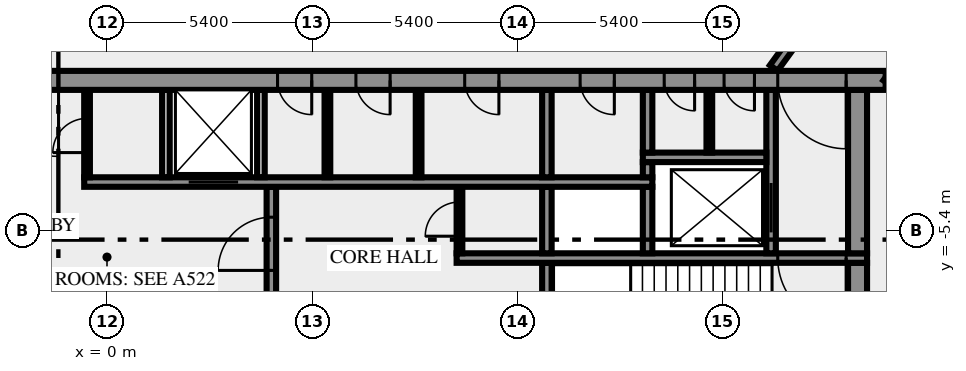
"""IFC4 building model, lengths in metres.
Left out: names, types, materials, properties, quantities, classifications, styles, units other than length and angle.
Written with IfcOpenShell. Run it as: python <this file> out.ifc"""

import sys

from ifc_helpers import new_model, si_unit, direction, frame, frame_2d, origin, place, context, subcontext, project, spatial, rectangle, extrude, element, fill, save


model = new_model("IFC4")
c1 = context("Model", 3, precision=1e-05, world=origin(), true_north=direction((0.0, 1.0)))
c2 = subcontext(c1, "Body", "Model", "MODEL_VIEW")
j1 = project(units=[si_unit("LENGTHUNIT", "METRE"), si_unit("PLANEANGLEUNIT", "RADIAN")], contexts=[c1])
p1 = place(None, origin())
s1 = spatial("IfcSite", under=j1, at=p1, CompositionType="ELEMENT")
p2 = place(p1, origin())
s2 = spatial("IfcBuilding", under=s1, at=p2, CompositionType="ELEMENT")
p3 = place(p2, frame((0.0, 0.0, 327.0)))
s3 = spatial("IfcBuildingStorey", under=s2, at=p3, CompositionType="ELEMENT", Elevation=327.0)
p4 = place(p3, frame((19.75, -10.5, 0.0), z_axis=(0.0, 0.0, 1.0), x_axis=(0.0, 1.0, 0.0)))
e1 = element("IfcWall", 1, at=p4, inside=s3, PredefinedType="SHEAR", context=c2, shape_type="SweptSolid", body=[
    extrude(rectangle(XDim=4.25, YDim=0.5, at=frame_2d((2.125, 0.0))), origin(), (0.0, 0.0, 1.0), 3.65),
])
p5 = place(p3, frame((4.325, -7.25, 0.0), z_axis=(0.0, 0.0, 1.0), x_axis=(0.0, 1.0, 0.0)))
e2 = element("IfcWall", 2, at=p5, inside=s3, PredefinedType="SHEAR", context=c2, shape_type="SweptSolid", body=[
    extrude(rectangle(XDim=3.0, YDim=0.25, at=frame_2d((1.5, 0.0))), origin(), (0.0, 0.0, 1.0), 3.65),
])
p6 = place(p5, frame((0.8, 0.0, 0.0)))
e3 = element("IfcOpeningElement", 3, at=p6, cuts=e2, PredefinedType="OPENING", context=c2, shape_type="SweptSolid", body=[
    extrude(rectangle(XDim=1.4, YDim=2.1, at=frame_2d((0.7, 1.05))), frame((0.0, 0.135, 0.0), z_axis=(0.0, -1.0, 0.0), x_axis=(1.0, 0.0, 0.0)), (0.0, 0.0, 1.0), 0.27),
])
p7 = place(p3, frame((11.575, -7.25, 0.0), z_axis=(0.0, 0.0, 1.0), x_axis=(0.0, 1.0, 0.0)))
e4 = element("IfcWall", 4, at=p7, inside=s3, PredefinedType="SHEAR", context=c2, shape_type="SweptSolid", body=[
    extrude(rectangle(XDim=1.0, YDim=0.25, at=frame_2d((0.5, 0.0))), origin(), (0.0, 0.0, 1.0), 3.65),
])
p8 = place(p3, frame((20.0, -6.125, 0.0), z_axis=(0.0, 0.0, 1.0), x_axis=(-1.0, 0.0, 0.0)))
e5 = element("IfcWall", 5, at=p8, inside=s3, PredefinedType="SHEAR", context=c2, shape_type="SweptSolid", body=[
    extrude(rectangle(XDim=10.8, YDim=0.25, at=frame_2d((5.4, 0.0))), origin(), (0.0, 0.0, 1.0), 3.65),
])
p9 = place(p8, frame((0.55, 0.0, 0.0)))
e6 = element("IfcOpeningElement", 6, at=p9, cuts=e5, PredefinedType="OPENING", context=c2, shape_type="SweptSolid", body=[
    extrude(rectangle(XDim=1.8, YDim=2.1, at=frame_2d((0.9, 1.05))), frame((0.0, 0.135, 0.0), z_axis=(0.0, -1.0, 0.0), x_axis=(1.0, 0.0, 0.0)), (0.0, 0.0, 1.0), 0.27),
])
p10 = place(p3, frame((9.275, -6.0, 0.0), z_axis=(0.0, 0.0, 1.0), x_axis=(0.0, 1.0, 0.0)))
e7 = element("IfcWall", 7, at=p10, inside=s3, PredefinedType="PARTITIONING", context=c2, shape_type="SweptSolid", body=[
    extrude(rectangle(XDim=1.75, YDim=0.15, at=frame_2d((0.875, 0.0))), origin(), (0.0, 0.0, 1.0), 3.65),
])
p11 = place(p10, frame((0.45, 0.0, 0.0)))
e8 = element("IfcOpeningElement", 8, at=p11, cuts=e7, PredefinedType="OPENING", context=c2, shape_type="SweptSolid", body=[
    extrude(rectangle(XDim=0.9, YDim=2.1, at=frame_2d((0.45, 1.05))), frame((0.0, 0.085, 0.0), z_axis=(0.0, -1.0, 0.0), x_axis=(1.0, 0.0, 0.0)), (0.0, 0.0, 1.0), 0.17),
])
for number, where, z_axis, x_axis in (
    (9, (11.575, -6.0, 0.0), (0.0, 0.0, 1.0), (0.0, 1.0, 0.0)),
    (10, (14.225, -6.0, 0.0), (0.0, 0.0, 1.0), (0.0, 1.0, 0.0)),
):
    element("IfcWall", number, at=place(p3, frame(where, z_axis=z_axis, x_axis=x_axis)), inside=s3, PredefinedType="SHEAR", context=c2, shape_type="SweptSolid", body=[
        extrude(rectangle(XDim=1.75, YDim=0.25, at=frame_2d((0.875, 0.0))), origin(), (0.0, 0.0, 1.0), 3.65),
    ])
p12 = place(p3, frame((17.475, -6.0, 0.0), z_axis=(0.0, 0.0, 1.0), x_axis=(0.0, 1.0, 0.0)))
e11 = element("IfcWall", 11, at=p12, inside=s3, PredefinedType="SHEAR", context=c2, shape_type="SweptSolid", body=[
    extrude(rectangle(XDim=4.3, YDim=0.25, at=frame_2d((2.15, 0.0))), origin(), (0.0, 0.0, 1.0), 3.65),
])
p13 = place(p12, frame((0.55, 0.0, 0.0)))
e12 = element("IfcOpeningElement", 12, at=p13, cuts=e11, PredefinedType="OPENING", context=c2, shape_type="SweptSolid", body=[
    extrude(rectangle(XDim=1.3, YDim=2.1, at=frame_2d((0.65, 1.05))), frame((0.0, 0.135, 0.0), z_axis=(0.0, -1.0, 0.0), x_axis=(1.0, 0.0, 0.0)), (0.0, 0.0, 1.0), 0.27),
])
p14 = place(p3, frame((19.75, -6.0, 0.0), z_axis=(0.0, 0.0, 1.0), x_axis=(0.0, 1.0, 0.0)))
e13 = element("IfcWall", 13, at=p14, inside=s3, PredefinedType="SHEAR", context=c2, shape_type="SweptSolid", body=[
    extrude(rectangle(XDim=4.3, YDim=0.5, at=frame_2d((2.15, 0.0))), origin(), (0.0, 0.0, 1.0), 3.65),
])
p15 = place(p3, frame((-0.6, -4.125, 0.0), z_axis=(0.0, 0.0, 1.0), x_axis=(1.0, 0.0, 0.0)))
e14 = element("IfcWall", 14, at=p15, inside=s3, PredefinedType="SHEAR", context=c2, shape_type="SweptSolid", body=[
    extrude(rectangle(XDim=14.95, YDim=0.25, at=frame_2d((7.475, 0.0))), origin(), (0.0, 0.0, 1.0), 3.65),
])
p16 = place(p15, frame((2.75, 0.0, 0.0)))
e15 = element("IfcOpeningElement", 15, at=p16, cuts=e14, PredefinedType="OPENING", context=c2, shape_type="SweptSolid", body=[
    extrude(rectangle(XDim=1.3, YDim=2.1, at=frame_2d((0.65, 1.05))), frame((0.0, 0.135, 0.0), z_axis=(0.0, -1.0, 0.0), x_axis=(1.0, 0.0, 0.0)), (0.0, 0.0, 1.0), 0.27),
])
p17 = place(p3, frame((-0.525, -4.0, 0.0), z_axis=(0.0, 0.0, 1.0), x_axis=(0.0, 1.0, 0.0)))
e16 = element("IfcWall", 16, at=p17, inside=s3, PredefinedType="PARTITIONING", context=c2, shape_type="SweptSolid", body=[
    extrude(rectangle(XDim=2.3, YDim=0.15, at=frame_2d((1.15, 0.0))), origin(), (0.0, 0.0, 1.0), 3.65),
])
p18 = place(p17, frame((0.65, 0.0, 0.0)))
e17 = element("IfcOpeningElement", 17, at=p18, cuts=e16, PredefinedType="OPENING", context=c2, shape_type="SweptSolid", body=[
    extrude(rectangle(XDim=0.9, YDim=2.1, at=frame_2d((0.45, 1.05))), frame((0.0, 0.085, 0.0), z_axis=(0.0, -1.0, 0.0), x_axis=(1.0, 0.0, 0.0)), (0.0, 0.0, 1.0), 0.17),
])
for number, where, z_axis, x_axis in (
    (18, (1.55, -4.0, 0.0), (0.0, 0.0, 1.0), (0.0, 1.0, 0.0)),
    (19, (4.05, -4.0, 0.0), (0.0, 0.0, 1.0), (0.0, 1.0, 0.0)),
):
    element("IfcWall", number, at=place(p3, frame(where, z_axis=z_axis, x_axis=x_axis)), inside=s3, PredefinedType="SOLIDWALL", context=c2, shape_type="SweptSolid", body=[
        extrude(rectangle(XDim=2.3, YDim=0.2, at=frame_2d((1.15, 0.0))), origin(), (0.0, 0.0, 1.0), 3.65),
    ])
for number, where, z_axis, x_axis in (
    (20, (5.8, -4.0, 0.0), (0.0, 0.0, 1.0), (0.0, 1.0, 0.0)),
    (21, (8.2, -4.0, 0.0), (0.0, 0.0, 1.0), (0.0, 1.0, 0.0)),
):
    element("IfcWall", number, at=place(p3, frame(where, z_axis=z_axis, x_axis=x_axis)), inside=s3, PredefinedType="PARTITIONING", context=c2, shape_type="SweptSolid", body=[
        extrude(rectangle(XDim=2.3, YDim=0.15, at=frame_2d((1.15, 0.0))), origin(), (0.0, 0.0, 1.0), 3.65),
    ])
p19 = place(p3, frame((11.575, -4.0, 0.0), z_axis=(0.0, 0.0, 1.0), x_axis=(0.0, 1.0, 0.0)))
e22 = element("IfcWall", 22, at=p19, inside=s3, PredefinedType="SHEAR", context=c2, shape_type="SweptSolid", body=[
    extrude(rectangle(XDim=2.3, YDim=0.25, at=frame_2d((1.15, 0.0))), origin(), (0.0, 0.0, 1.0), 3.65),
])
p20 = place(p3, frame((14.225, -4.0, 0.0), z_axis=(0.0, 0.0, 1.0), x_axis=(0.0, 1.0, 0.0)))
e23 = element("IfcWall", 23, at=p20, inside=s3, PredefinedType="SHEAR", context=c2, shape_type="SweptSolid", body=[
    extrude(rectangle(XDim=0.4, YDim=0.25, at=frame_2d((0.2, 0.0))), origin(), (0.0, 0.0, 1.0), 3.65),
])
p21 = place(p3, frame((14.1, -3.475, 0.0), z_axis=(0.0, 0.0, 1.0), x_axis=(1.0, 0.0, 0.0)))
e24 = element("IfcWall", 24, at=p21, inside=s3, PredefinedType="SHEAR", context=c2, shape_type="SweptSolid", body=[
    extrude(rectangle(XDim=3.25, YDim=0.25, at=frame_2d((1.625, 0.0))), origin(), (0.0, 0.0, 1.0), 3.65),
])
p22 = place(p3, frame((14.225, -3.35, 0.0), z_axis=(0.0, 0.0, 1.0), x_axis=(0.0, 1.0, 0.0)))
e25 = element("IfcWall", 25, at=p22, inside=s3, PredefinedType="SHEAR", context=c2, shape_type="SweptSolid", body=[
    extrude(rectangle(XDim=1.65, YDim=0.25, at=frame_2d((0.825, 0.0))), origin(), (0.0, 0.0, 1.0), 3.65),
])
p23 = place(p3, frame((15.85, -3.35, 0.0), z_axis=(0.0, 0.0, 1.0), x_axis=(0.0, 1.0, 0.0)))
e26 = element("IfcWall", 26, at=p23, inside=s3, PredefinedType="PARTITIONING", context=c2, shape_type="SweptSolid", body=[
    extrude(rectangle(XDim=1.65, YDim=0.15, at=frame_2d((0.825, 0.0))), origin(), (0.0, 0.0, 1.0), 3.65),
])
p24 = place(p3, frame((20.49, -1.45, 0.0), z_axis=(0.0, 0.0, 1.0), x_axis=(-1.0, 0.0, 0.0)))
e27 = element("IfcWall", 27, at=p24, inside=s3, PredefinedType="SHEAR", context=c2, shape_type="SweptSolid", body=[
    extrude(rectangle(XDim=40.98, YDim=0.5, at=frame_2d((20.49, 0.0))), origin(), (0.0, 0.0, 1.0), 3.65),
])
p25 = place(p24, frame((38.14, 0.0, 0.0)))
e28 = element("IfcOpeningElement", 28, at=p25, cuts=e27, PredefinedType="OPENING", context=c2, shape_type="SweptSolid", body=[
    extrude(rectangle(XDim=1.8, YDim=2.1, at=frame_2d((0.9, 1.05))), frame((0.0, 0.26, 0.0), z_axis=(0.0, -1.0, 0.0), x_axis=(1.0, 0.0, 0.0)), (0.0, 0.0, 1.0), 0.52),
])
p26 = place(p24, frame((35.89, 0.0, 0.0)))
e29 = element("IfcOpeningElement", 29, at=p26, cuts=e27, PredefinedType="OPENING", context=c2, shape_type="SweptSolid", body=[
    extrude(rectangle(XDim=0.9, YDim=2.1, at=frame_2d((0.45, 1.05))), frame((0.0, 0.26, 0.0), z_axis=(0.0, -1.0, 0.0), x_axis=(1.0, 0.0, 0.0)), (0.0, 0.0, 1.0), 0.52),
])
p27 = place(p24, frame((32.94, 0.0, 0.0)))
e30 = element("IfcOpeningElement", 30, at=p27, cuts=e27, PredefinedType="OPENING", context=c2, shape_type="SweptSolid", body=[
    extrude(rectangle(XDim=0.9, YDim=2.1, at=frame_2d((0.45, 1.05))), frame((0.0, 0.26, 0.0), z_axis=(0.0, -1.0, 0.0), x_axis=(1.0, 0.0, 0.0)), (0.0, 0.0, 1.0), 0.52),
])
p28 = place(p24, frame((31.015, 0.0, 0.0)))
e31 = element("IfcOpeningElement", 31, at=p28, cuts=e27, PredefinedType="OPENING", context=c2, shape_type="SweptSolid", body=[
    extrude(rectangle(XDim=0.8, YDim=2.1, at=frame_2d((0.4, 1.05))), frame((0.0, 0.26, 0.0), z_axis=(0.0, -1.0, 0.0), x_axis=(1.0, 0.0, 0.0)), (0.0, 0.0, 1.0), 0.52),
])
p29 = place(p24, frame((24.765, 0.0, 0.0)))
e32 = element("IfcOpeningElement", 32, at=p29, cuts=e27, PredefinedType="OPENING", context=c2, shape_type="SweptSolid", body=[
    extrude(rectangle(XDim=0.8, YDim=2.1, at=frame_2d((0.4, 1.05))), frame((0.0, 0.26, 0.0), z_axis=(0.0, -1.0, 0.0), x_axis=(1.0, 0.0, 0.0)), (0.0, 0.0, 1.0), 0.52),
])
p30 = place(p24, frame((21.765, 0.0, 0.0)))
e33 = element("IfcOpeningElement", 33, at=p30, cuts=e27, PredefinedType="OPENING", context=c2, shape_type="SweptSolid", body=[
    extrude(rectangle(XDim=2.0, YDim=2.1, at=frame_2d((1.0, 1.05))), frame((0.0, 0.26, 0.0), z_axis=(0.0, -1.0, 0.0), x_axis=(1.0, 0.0, 0.0)), (0.0, 0.0, 1.0), 0.52),
])
p31 = place(p24, frame((15.103, 0.0, 0.0)))
e34 = element("IfcOpeningElement", 34, at=p31, cuts=e27, PredefinedType="OPENING", context=c2, shape_type="SweptSolid", body=[
    extrude(rectangle(XDim=0.9, YDim=2.1, at=frame_2d((0.45, 1.05))), frame((0.0, 0.26, 0.0), z_axis=(0.0, -1.0, 0.0), x_axis=(1.0, 0.0, 0.0)), (0.0, 0.0, 1.0), 0.52),
])
p32 = place(p24, frame((13.04, 0.0, 0.0)))
e35 = element("IfcOpeningElement", 35, at=p32, cuts=e27, PredefinedType="OPENING", context=c2, shape_type="SweptSolid", body=[
    extrude(rectangle(XDim=0.9, YDim=2.1, at=frame_2d((0.45, 1.05))), frame((0.0, 0.26, 0.0), z_axis=(0.0, -1.0, 0.0), x_axis=(1.0, 0.0, 0.0)), (0.0, 0.0, 1.0), 0.52),
])
p33 = place(p24, frame((10.177, 0.0, 0.0)))
e36 = element("IfcOpeningElement", 36, at=p33, cuts=e27, PredefinedType="OPENING", context=c2, shape_type="SweptSolid", body=[
    extrude(rectangle(XDim=0.9, YDim=2.1, at=frame_2d((0.45, 1.05))), frame((0.0, 0.26, 0.0), z_axis=(0.0, -1.0, 0.0), x_axis=(1.0, 0.0, 0.0)), (0.0, 0.0, 1.0), 0.52),
])
p34 = place(p24, frame((7.14, 0.0, 0.0)))
e37 = element("IfcOpeningElement", 37, at=p34, cuts=e27, PredefinedType="OPENING", context=c2, shape_type="SweptSolid", body=[
    extrude(rectangle(XDim=0.9, YDim=2.1, at=frame_2d((0.45, 1.05))), frame((0.0, 0.26, 0.0), z_axis=(0.0, -1.0, 0.0), x_axis=(1.0, 0.0, 0.0)), (0.0, 0.0, 1.0), 0.52),
])
p35 = place(p24, frame((5.028, 0.0, 0.0)))
e38 = element("IfcOpeningElement", 38, at=p35, cuts=e27, PredefinedType="OPENING", context=c2, shape_type="SweptSolid", body=[
    extrude(rectangle(XDim=0.8, YDim=2.1, at=frame_2d((0.4, 1.05))), frame((0.0, 0.26, 0.0), z_axis=(0.0, -1.0, 0.0), x_axis=(1.0, 0.0, 0.0)), (0.0, 0.0, 1.0), 0.52),
])
p36 = place(p24, frame((3.452, 0.0, 0.0)))
e39 = element("IfcOpeningElement", 39, at=p36, cuts=e27, PredefinedType="OPENING", context=c2, shape_type="SweptSolid", body=[
    extrude(rectangle(XDim=0.8, YDim=2.1, at=frame_2d((0.4, 1.05))), frame((0.0, 0.26, 0.0), z_axis=(0.0, -1.0, 0.0), x_axis=(1.0, 0.0, 0.0)), (0.0, 0.0, 1.0), 0.52),
])
p37 = place(p24, frame((1.04, 0.0, 0.0)))
e40 = element("IfcOpeningElement", 40, at=p37, cuts=e27, PredefinedType="OPENING", context=c2, shape_type="SweptSolid", body=[
    extrude(rectangle(XDim=1.8, YDim=2.1, at=frame_2d((0.9, 1.05))), frame((0.0, 0.26, 0.0), z_axis=(0.0, -1.0, 0.0), x_axis=(1.0, 0.0, 0.0)), (0.0, 0.0, 1.0), 0.52),
])
p38 = place(p3, frame((17.545, -1.125, 0.0), z_axis=(0.0, 0.0, 1.0), x_axis=(0.58779555165, 0.809009511354, 0.0)))
e41 = element("IfcWall", 41, at=p38, inside=s3, PredefinedType="SOLIDWALL", context=c2, shape_type="SweptSolid", body=[
    extrude(rectangle(XDim=18.103, YDim=0.25, at=frame_2d((9.052, 0.0))), origin(), (0.0, 0.0, 1.0), 3.65),
])
p39 = place(p38, frame((3.441, 0.0, 0.0)))
e42 = element("IfcOpeningElement", 42, at=p39, cuts=e41, PredefinedType="OPENING", context=c2, shape_type="SweptSolid", body=[
    extrude(rectangle(XDim=0.9, YDim=2.1, at=frame_2d((0.45, 1.05))), frame((0.0, 0.135, 0.0), z_axis=(0.0, -1.0, 0.0), x_axis=(1.0, 0.0, 0.0)), (0.0, 0.0, 1.0), 0.27),
])
p40 = place(p3, frame((30.183, 11.761, 0.0), z_axis=(0.0, 0.0, 1.0), x_axis=(-0.587781762867, -0.80901952958, 0.0)))
e43 = element("IfcWall", 43, at=p40, inside=s3, PredefinedType="SOLIDWALL", context=c2, shape_type="SweptSolid", body=[
    extrude(rectangle(XDim=16.42, YDim=0.25, at=frame_2d((8.21, 0.0))), origin(), (0.0, 0.0, 1.0), 3.65),
])
p41 = place(p40, frame((0.225, 0.0, 0.0)))
e44 = element("IfcOpeningElement", 44, at=p41, cuts=e43, PredefinedType="OPENING", context=c2, shape_type="SweptSolid", body=[
    extrude(rectangle(XDim=0.9, YDim=2.1, at=frame_2d((0.45, 1.05))), frame((0.0, 0.135, 0.0), z_axis=(0.0, -1.0, 0.0), x_axis=(1.0, 0.0, 0.0)), (0.0, 0.0, 1.0), 0.27),
])
p42 = place(p40, frame((6.605, 0.0, 0.0)))
e45 = element("IfcOpeningElement", 45, at=p42, cuts=e43, PredefinedType="OPENING", context=c2, shape_type="SweptSolid", body=[
    extrude(rectangle(XDim=0.9, YDim=2.1, at=frame_2d((0.45, 1.05))), frame((0.0, 0.135, 0.0), z_axis=(0.0, -1.0, 0.0), x_axis=(1.0, 0.0, 0.0)), (0.0, 0.0, 1.0), 0.27),
])
p43 = place(p6, origin())
e46 = element("IfcDoor", 46, at=p43, inside=s3, OperationType="DOUBLE_DOOR_SINGLE_SWING", PredefinedType="DOOR", context=c2, shape_type="SweptSolid", body=[
    extrude(rectangle(XDim=1.4, YDim=2.1, at=frame_2d((0.7, 1.05))), frame((0.0, 0.025, 0.0), z_axis=(0.0, -1.0, 0.0), x_axis=(1.0, 0.0, 0.0)), (0.0, 0.0, 1.0), 0.05),
])
fill(e3, e46)
p44 = place(p9, origin())
e47 = element("IfcDoor", 47, at=p44, inside=s3, OperationType="DOUBLE_DOOR_SINGLE_SWING", PredefinedType="DOOR", context=c2, shape_type="SweptSolid", body=[
    extrude(rectangle(XDim=1.8, YDim=2.1, at=frame_2d((0.9, 1.05))), frame((0.0, 0.025, 0.0), z_axis=(0.0, -1.0, 0.0), x_axis=(1.0, 0.0, 0.0)), (0.0, 0.0, 1.0), 0.05),
])
fill(e6, e47)
p45 = place(p11, origin())
e48 = element("IfcDoor", 48, at=p45, inside=s3, OperationType="SINGLE_SWING_RIGHT", PredefinedType="DOOR", context=c2, shape_type="SweptSolid", body=[
    extrude(rectangle(XDim=0.9, YDim=2.1, at=frame_2d((0.45, 1.05))), frame((0.0, 0.025, 0.0), z_axis=(0.0, -1.0, 0.0), x_axis=(1.0, 0.0, 0.0)), (0.0, 0.0, 1.0), 0.05),
])
fill(e8, e48)
p46 = place(p13, origin())
e49 = element("IfcDoor", 49, at=p46, inside=s3, OperationType="DOUBLE_DOOR_SLIDING", PredefinedType="DOOR", context=c2, shape_type="SweptSolid", body=[
    extrude(rectangle(XDim=1.3, YDim=2.1, at=frame_2d((0.65, 1.05))), frame((0.0, 0.025, 0.0), z_axis=(0.0, -1.0, 0.0), x_axis=(1.0, 0.0, 0.0)), (0.0, 0.0, 1.0), 0.05),
])
fill(e12, e49)
p47 = place(p16, origin())
e50 = element("IfcDoor", 50, at=p47, inside=s3, OperationType="DOUBLE_DOOR_SLIDING", PredefinedType="DOOR", context=c2, shape_type="SweptSolid", body=[
    extrude(rectangle(XDim=1.3, YDim=2.1, at=frame_2d((0.65, 1.05))), frame((0.0, 0.025, 0.0), z_axis=(0.0, -1.0, 0.0), x_axis=(1.0, 0.0, 0.0)), (0.0, 0.0, 1.0), 0.05),
])
fill(e15, e50)
p48 = place(p18, origin())
e51 = element("IfcDoor", 51, at=p48, inside=s3, OperationType="SINGLE_SWING_LEFT", PredefinedType="DOOR", context=c2, shape_type="SweptSolid", body=[
    extrude(rectangle(XDim=0.9, YDim=2.1, at=frame_2d((0.45, 1.05))), frame((0.0, 0.025, 0.0), z_axis=(0.0, -1.0, 0.0), x_axis=(1.0, 0.0, 0.0)), (0.0, 0.0, 1.0), 0.05),
])
fill(e17, e51)
p49 = place(p30, origin())
e52 = element("IfcDoor", 52, at=p49, inside=s3, OperationType="DOUBLE_DOOR_SINGLE_SWING", PredefinedType="DOOR", context=c2, shape_type="SweptSolid", body=[
    extrude(rectangle(XDim=2.0, YDim=2.1, at=frame_2d((1.0, 1.05))), frame((0.0, 0.025, 0.0), z_axis=(0.0, -1.0, 0.0), x_axis=(1.0, 0.0, 0.0)), (0.0, 0.0, 1.0), 0.05),
])
fill(e33, e52)
p50 = place(p31, origin())
e53 = element("IfcDoor", 53, at=p50, inside=s3, OperationType="SINGLE_SWING_LEFT", PredefinedType="DOOR", context=c2, shape_type="SweptSolid", body=[
    extrude(rectangle(XDim=0.9, YDim=2.1, at=frame_2d((0.45, 1.05))), frame((0.0, 0.025, 0.0), z_axis=(0.0, -1.0, 0.0), x_axis=(1.0, 0.0, 0.0)), (0.0, 0.0, 1.0), 0.05),
])
fill(e34, e53)
p51 = place(p32, origin())
e54 = element("IfcDoor", 54, at=p51, inside=s3, OperationType="SINGLE_SWING_LEFT", PredefinedType="DOOR", context=c2, shape_type="SweptSolid", body=[
    extrude(rectangle(XDim=0.9, YDim=2.1, at=frame_2d((0.45, 1.05))), frame((0.0, 0.025, 0.0), z_axis=(0.0, -1.0, 0.0), x_axis=(1.0, 0.0, 0.0)), (0.0, 0.0, 1.0), 0.05),
])
fill(e35, e54)
p52 = place(p33, origin())
e55 = element("IfcDoor", 55, at=p52, inside=s3, OperationType="SINGLE_SWING_LEFT", PredefinedType="DOOR", context=c2, shape_type="SweptSolid", body=[
    extrude(rectangle(XDim=0.9, YDim=2.1, at=frame_2d((0.45, 1.05))), frame((0.0, 0.025, 0.0), z_axis=(0.0, -1.0, 0.0), x_axis=(1.0, 0.0, 0.0)), (0.0, 0.0, 1.0), 0.05),
])
fill(e36, e55)
p53 = place(p34, origin())
e56 = element("IfcDoor", 56, at=p53, inside=s3, OperationType="SINGLE_SWING_LEFT", PredefinedType="DOOR", context=c2, shape_type="SweptSolid", body=[
    extrude(rectangle(XDim=0.9, YDim=2.1, at=frame_2d((0.45, 1.05))), frame((0.0, 0.025, 0.0), z_axis=(0.0, -1.0, 0.0), x_axis=(1.0, 0.0, 0.0)), (0.0, 0.0, 1.0), 0.05),
])
fill(e37, e56)
p54 = place(p35, origin())
e57 = element("IfcDoor", 57, at=p54, inside=s3, OperationType="SINGLE_SWING_LEFT", PredefinedType="DOOR", context=c2, shape_type="SweptSolid", body=[
    extrude(rectangle(XDim=0.8, YDim=2.1, at=frame_2d((0.4, 1.05))), frame((0.0, 0.025, 0.0), z_axis=(0.0, -1.0, 0.0), x_axis=(1.0, 0.0, 0.0)), (0.0, 0.0, 1.0), 0.05),
])
fill(e38, e57)
p55 = place(p36, origin())
e58 = element("IfcDoor", 58, at=p55, inside=s3, OperationType="SINGLE_SWING_LEFT", PredefinedType="DOOR", context=c2, shape_type="SweptSolid", body=[
    extrude(rectangle(XDim=0.8, YDim=2.1, at=frame_2d((0.4, 1.05))), frame((0.0, 0.025, 0.0), z_axis=(0.0, -1.0, 0.0), x_axis=(1.0, 0.0, 0.0)), (0.0, 0.0, 1.0), 0.05),
])
fill(e39, e58)
p56 = place(p37, origin())
e59 = element("IfcDoor", 59, at=p56, inside=s3, OperationType="DOUBLE_DOOR_SINGLE_SWING", PredefinedType="DOOR", context=c2, shape_type="SweptSolid", body=[
    extrude(rectangle(XDim=1.8, YDim=2.1, at=frame_2d((0.9, 1.05))), frame((0.0, 0.025, 0.0), z_axis=(0.0, -1.0, 0.0), x_axis=(1.0, 0.0, 0.0)), (0.0, 0.0, 1.0), 0.05),
])
fill(e40, e59)
save(model, sys.argv[1])
